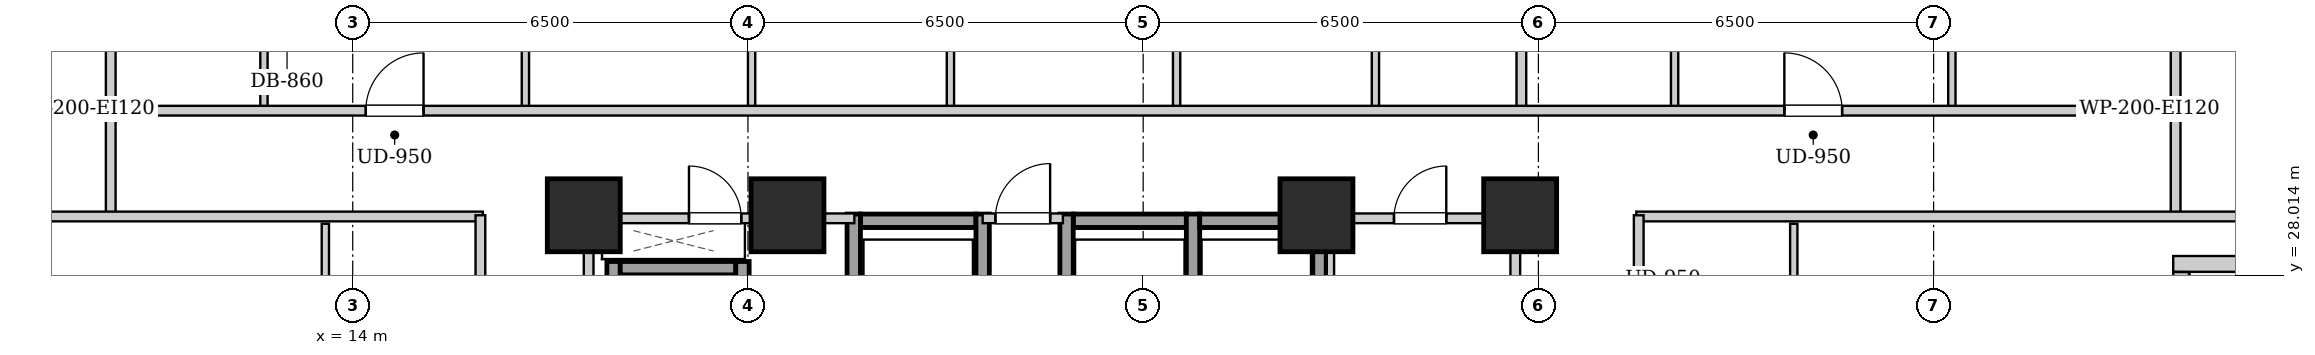
"""IFC4 building model, lengths in metres.
Left out: names, types, materials, properties, quantities, classifications, styles, units other than length and angle.
Written with IfcOpenShell. Run it as: python <this file> out.ifc"""

import sys

from ifc_helpers import new_model, si_unit, direction, frame, frame_2d, origin, origin_2d, place, context, subcontext, project, spatial, rectangle, extrude, element, fill, save


model = new_model("IFC4")
c1 = context("Model", 3, precision=1e-05, world=origin(), true_north=direction((0.0, 1.0)))
c2 = subcontext(c1, "Body", "Model", "MODEL_VIEW")
j1 = project(units=[si_unit("LENGTHUNIT", "METRE"), si_unit("PLANEANGLEUNIT", "RADIAN")], contexts=[c1])
p1 = place(None, origin())
s1 = spatial("IfcSite", under=j1, at=p1, CompositionType="ELEMENT")
p2 = place(p1, origin())
s2 = spatial("IfcBuilding", under=s1, at=p2, CompositionType="ELEMENT")
p3 = place(p2, frame((0.0, 0.0, 48.2)))
s3 = spatial("IfcBuildingStorey", under=s2, at=p3, CompositionType="ELEMENT", Elevation=48.2)
for number, where, z_axis, x_axis in (
    (1, (17.8, 29.0, 0.0), (0.0, 0.0, 1.0), (1.0, 0.0, 0.0)),
    (2, (21.15, 29.0, 0.0), (0.0, 0.0, 1.0), (1.0, 0.0, 0.0)),
    (3, (29.85, 29.0, 0.0), (0.0, 0.0, 1.0), (1.0, 0.0, 0.0)),
    (4, (33.2, 29.0, 0.0), (0.0, 0.0, 1.0), (1.0, 0.0, 0.0)),
):
    element("IfcColumn", number, at=place(p3, frame(where, z_axis=z_axis, x_axis=x_axis)), inside=s3, PredefinedType="COLUMN", context=c2, shape_type="SweptSolid", body=[
        extrude(rectangle(XDim=1.2, YDim=1.2, at=origin_2d()), origin(), (0.0, 0.0, 1.0), 3.2),
    ])
p4 = place(p3, frame((46.34, 28.2, 0.0), z_axis=(0.0, 0.0, 1.0), x_axis=(-1.0, 0.0, 0.0)))
e5 = element("IfcWall", 5, at=p4, inside=s3, PredefinedType="SOLIDWALL", context=c2, shape_type="SweptSolid", body=[
    extrude(rectangle(XDim=2.4, YDim=0.26, at=frame_2d((1.2, 0.0))), origin(), (0.0, 0.0, 1.0), 2.94),
])
p5 = place(p3, frame((44.07, 28.066, 0.0), z_axis=(0.0, 0.0, 1.0), x_axis=(0.0, -1.0, 0.0)))
e6 = element("IfcWall", 6, at=p5, inside=s3, PredefinedType="SOLIDWALL", context=c2, shape_type="SweptSolid", body=[
    extrude(rectangle(XDim=3.332, YDim=0.26, at=frame_2d((1.666, 0.0))), origin(), (0.0, 0.0, 1.0), 2.94),
])
p6 = place(p5, frame((1.116, 0.0, 0.0)))
e7 = element("IfcOpeningElement", 7, at=p6, cuts=e6, PredefinedType="OPENING", context=c2, shape_type="SweptSolid", body=[
    extrude(rectangle(XDim=1.1, YDim=2.0, at=frame_2d((0.55, 1.0))), frame((0.0, 0.14, 0.0), z_axis=(0.0, -1.0, 0.0), x_axis=(1.0, 0.0, 0.0)), (0.0, 0.0, 1.0), 0.28),
])
p7 = place(p5, frame((0.276, 0.0, 0.55)))
e8 = element("IfcOpeningElement", 8, at=p7, cuts=e6, PredefinedType="OPENING", context=c2, shape_type="SweptSolid", body=[
    extrude(rectangle(XDim=0.68, YDim=1.2, at=frame_2d((0.34, 0.6))), frame((0.0, 0.14, 0.0), z_axis=(0.0, -1.0, 0.0), x_axis=(1.0, 0.0, 0.0)), (0.0, 0.0, 1.0), 0.28),
])
p8 = place(p3, frame((22.35, 28.91, 0.0), z_axis=(0.0, 0.0, 1.0), x_axis=(1.0, 0.0, 0.0)))
e9 = element("IfcWall", 9, at=p8, inside=s3, PredefinedType="SHEAR", context=c2, shape_type="SweptSolid", body=[
    extrude(rectangle(XDim=1.9, YDim=0.22, at=frame_2d((0.95, 0.0))), origin(), (0.0, 0.0, 1.0), 2.94),
])
for number, where, z_axis, x_axis in (
    (10, (22.24, 26.58, 0.0), (0.0, 0.0, 1.0), (0.0, 1.0, 0.0)),
    (11, (24.36, 26.58, 0.0), (0.0, 0.0, 1.0), (0.0, 1.0, 0.0)),
):
    element("IfcWall", number, at=place(p3, frame(where, z_axis=z_axis, x_axis=x_axis)), inside=s3, PredefinedType="SHEAR", context=c2, shape_type="SweptSolid", body=[
        extrude(rectangle(XDim=2.44, YDim=0.22, at=frame_2d((1.22, 0.0))), origin(), (0.0, 0.0, 1.0), 2.94),
    ])
p9 = place(p3, frame((25.85, 28.91, 0.0), z_axis=(0.0, 0.0, 1.0), x_axis=(1.0, 0.0, 0.0)))
e12 = element("IfcWall", 12, at=p9, inside=s3, PredefinedType="SHEAR", context=c2, shape_type="SweptSolid", body=[
    extrude(rectangle(XDim=1.86, YDim=0.22, at=frame_2d((0.93, 0.0))), origin(), (0.0, 0.0, 1.0), 2.94),
])
for number, where, z_axis, x_axis in (
    (13, (25.74, 26.58, 0.0), (0.0, 0.0, 1.0), (0.0, 1.0, 0.0)),
    (14, (27.82, 26.58, 0.0), (0.0, 0.0, 1.0), (0.0, 1.0, 0.0)),
):
    element("IfcWall", number, at=place(p3, frame(where, z_axis=z_axis, x_axis=x_axis)), inside=s3, PredefinedType="SHEAR", context=c2, shape_type="SweptSolid", body=[
        extrude(rectangle(XDim=2.44, YDim=0.22, at=frame_2d((1.22, 0.0))), origin(), (0.0, 0.0, 1.0), 2.94),
    ])
p10 = place(p3, frame((27.93, 28.91, 0.0), z_axis=(0.0, 0.0, 1.0), x_axis=(1.0, 0.0, 0.0)))
e15 = element("IfcWall", 15, at=p10, inside=s3, PredefinedType="SHEAR", context=c2, shape_type="SweptSolid", body=[
    extrude(rectangle(XDim=1.86, YDim=0.22, at=frame_2d((0.93, 0.0))), origin(), (0.0, 0.0, 1.0), 2.94),
])
p11 = place(p3, frame((29.9, 26.58, 0.0), z_axis=(0.0, 0.0, 1.0), x_axis=(0.0, 1.0, 0.0)))
e16 = element("IfcWall", 16, at=p11, inside=s3, PredefinedType="SHEAR", context=c2, shape_type="SweptSolid", body=[
    extrude(rectangle(XDim=2.44, YDim=0.22, at=frame_2d((1.22, 0.0))), origin(), (0.0, 0.0, 1.0), 2.94),
])
p12 = place(p3, frame((18.29, 24.1, 0.0), z_axis=(0.0, 0.0, 1.0), x_axis=(0.0, 1.0, 0.0)))
e17 = element("IfcWall", 17, at=p12, inside=s3, PredefinedType="SHEAR", context=c2, shape_type="SweptSolid", body=[
    extrude(rectangle(XDim=4.14, YDim=0.22, at=frame_2d((2.07, 0.0))), origin(), (0.0, 0.0, 1.0), 2.94),
])
p13 = place(p3, frame((18.4, 28.13, 0.0), z_axis=(0.0, 0.0, 1.0), x_axis=(1.0, 0.0, 0.0)))
e18 = element("IfcWall", 18, at=p13, inside=s3, PredefinedType="SHEAR", context=c2, shape_type="SweptSolid", body=[
    extrude(rectangle(XDim=1.9, YDim=0.22, at=frame_2d((0.95, 0.0))), origin(), (0.0, 0.0, 1.0), 2.94),
])
p14 = place(p3, frame((20.41, 26.06, 0.0), z_axis=(0.0, 0.0, 1.0), x_axis=(0.0, 1.0, 0.0)))
e19 = element("IfcWall", 19, at=p14, inside=s3, PredefinedType="SHEAR", context=c2, shape_type="SweptSolid", body=[
    extrude(rectangle(XDim=2.18, YDim=0.22, at=frame_2d((1.09, 0.0))), origin(), (0.0, 0.0, 1.0), 2.94),
])
for number, where, z_axis, x_axis in (
    (20, (17.88, 24.12, 0.0), (0.0, 0.0, 1.0), (0.0, 1.0, 0.0)),
    (21, (33.12, 24.12, 0.0), (0.0, 0.0, 1.0), (0.0, 1.0, 0.0)),
):
    element("IfcWall", number, at=place(p3, frame(where, z_axis=z_axis, x_axis=x_axis)), inside=s3, PredefinedType="PARTITIONING", context=c2, shape_type="SweptSolid", body=[
        extrude(rectangle(XDim=4.76, YDim=0.16, at=frame_2d((2.38, 0.0))), origin(), (0.0, 0.0, 1.0), 2.275),
    ])
p15 = place(p3, frame((24.36, 28.95, 0.0), z_axis=(0.0, 0.0, 1.0), x_axis=(1.0, 0.0, 0.0)))
e22 = element("IfcWall", 22, at=p15, inside=s3, PredefinedType="PARTITIONING", context=c2, shape_type="SweptSolid", body=[
    extrude(rectangle(XDim=1.32, YDim=0.16, at=frame_2d((0.66, 0.0))), origin(), (0.0, 0.0, 1.0), 2.232),
])
p16 = place(p15, frame((0.21, 0.0, 0.0)))
e23 = element("IfcOpeningElement", 23, at=p16, cuts=e22, PredefinedType="OPENING", context=c2, shape_type="SweptSolid", body=[
    extrude(rectangle(XDim=0.9, YDim=2.05, at=frame_2d((0.45, 1.025))), frame((0.0, 0.09, 0.0), z_axis=(0.0, -1.0, 0.0), x_axis=(1.0, 0.0, 0.0)), (0.0, 0.0, 1.0), 0.18),
])
p17 = place(p3, frame((17.96, 28.95, 0.0), z_axis=(0.0, 0.0, 1.0), x_axis=(1.0, 0.0, 0.0)))
e24 = element("IfcWall", 24, at=p17, inside=s3, PredefinedType="PARTITIONING", context=c2, shape_type="SweptSolid", body=[
    extrude(rectangle(XDim=4.29, YDim=0.16, at=frame_2d((2.145, 0.0))), origin(), (0.0, 0.0, 1.0), 2.232),
])
p18 = place(p17, frame((1.57, 0.0, 0.0)))
e25 = element("IfcOpeningElement", 25, at=p18, cuts=e24, PredefinedType="OPENING", context=c2, shape_type="SweptSolid", body=[
    extrude(rectangle(XDim=0.86, YDim=2.05, at=frame_2d((0.43, 1.025))), frame((0.0, 0.09, 0.0), z_axis=(0.0, -1.0, 0.0), x_axis=(1.0, 0.0, 0.0)), (0.0, 0.0, 1.0), 0.18),
])
p19 = place(p3, frame((30.08, 26.18, 0.0), z_axis=(0.0, 0.0, 1.0), x_axis=(0.0, 1.0, 0.0)))
e26 = element("IfcWall", 26, at=p19, inside=s3, PredefinedType="PARTITIONING", context=c2, shape_type="SweptSolid", body=[
    extrude(rectangle(XDim=2.68, YDim=0.12, at=frame_2d((1.34, 0.0))), origin(), (0.0, 0.0, 1.0), 2.94),
])
p20 = place(p3, frame((30.08, 28.95, 0.0), z_axis=(0.0, 0.0, 1.0), x_axis=(1.0, 0.0, 0.0)))
e27 = element("IfcWall", 27, at=p20, inside=s3, PredefinedType="PARTITIONING", context=c2, shape_type="SweptSolid", body=[
    extrude(rectangle(XDim=2.96, YDim=0.16, at=frame_2d((1.48, 0.0))), origin(), (0.0, 0.0, 1.0), 2.94),
])
p21 = place(p20, frame((1.045, 0.0, 0.0)))
e28 = element("IfcOpeningElement", 28, at=p21, cuts=e27, PredefinedType="OPENING", context=c2, shape_type="SweptSolid", body=[
    extrude(rectangle(XDim=0.86, YDim=2.05, at=frame_2d((0.43, 1.025))), frame((0.0, 0.09, 0.0), z_axis=(0.0, -1.0, 0.0), x_axis=(1.0, 0.0, 0.0)), (0.0, 0.0, 1.0), 0.18),
])
for number, where, z_axis, x_axis in (
    (29, (10.02, 28.98, 0.0), (0.0, 0.0, 1.0), (0.0, 1.0, 0.0)),
    (30, (43.98, 28.98, 0.0), (0.0, 0.0, 1.0), (0.0, 1.0, 0.0)),
):
    element("IfcWall", number, at=place(p3, frame(where, z_axis=z_axis, x_axis=x_axis)), inside=s3, PredefinedType="PARTITIONING", context=c2, shape_type="SweptSolid", body=[
        extrude(rectangle(XDim=1.74, YDim=0.16, at=frame_2d((0.87, 0.0))), origin(), (0.0, 0.0, 1.0), 2.94),
    ])
p22 = place(p3, frame((7.78, 28.98, 0.0), z_axis=(0.0, 0.0, 1.0), x_axis=(1.0, 0.0, 0.0)))
e31 = element("IfcWall", 31, at=p22, inside=s3, PredefinedType="PARTITIONING", context=c2, shape_type="SweptSolid", body=[
    extrude(rectangle(XDim=8.36, YDim=0.16, at=frame_2d((4.18, 0.0))), origin(), (0.0, 0.0, 1.0), 2.232),
])
p23 = place(p3, frame((35.11, 28.98, 0.0), z_axis=(0.0, 0.0, 1.0), x_axis=(1.0, 0.0, 0.0)))
e32 = element("IfcWall", 32, at=p23, inside=s3, PredefinedType="PARTITIONING", context=c2, shape_type="SweptSolid", body=[
    extrude(rectangle(XDim=11.11, YDim=0.16, at=frame_2d((5.555, 0.0))), origin(), (0.0, 0.0, 1.0), 2.232),
])
p24 = place(p3, frame((10.02, 30.76, 0.0), z_axis=(0.0, 0.0, 1.0), x_axis=(0.0, 1.0, 0.0)))
e33 = element("IfcWall", 33, at=p24, inside=s3, PredefinedType="PARTITIONING", context=c2, shape_type="SweptSolid", body=[
    extrude(rectangle(XDim=2.91, YDim=0.16, at=frame_2d((1.455, 0.0))), origin(), (0.0, 0.0, 1.0), 2.94),
])
p25 = place(p3, frame((12.54, 30.76, 0.0), z_axis=(0.0, 0.0, 1.0), x_axis=(0.0, 1.0, 0.0)))
e34 = element("IfcWall", 34, at=p25, inside=s3, PredefinedType="PARTITIONING", context=c2, shape_type="SweptSolid", body=[
    extrude(rectangle(XDim=2.85, YDim=0.12, at=frame_2d((1.425, 0.0))), origin(), (0.0, 0.0, 1.0), 2.94),
])
p26 = place(p25, frame((0.995, 0.0, 0.0)))
e35 = element("IfcOpeningElement", 35, at=p26, cuts=e34, PredefinedType="OPENING", context=c2, shape_type="SweptSolid", body=[
    extrude(rectangle(XDim=0.86, YDim=2.05, at=frame_2d((0.43, 1.025))), frame((0.0, 0.07, 0.0), z_axis=(0.0, -1.0, 0.0), x_axis=(1.0, 0.0, 0.0)), (0.0, 0.0, 1.0), 0.14),
])
p27 = place(p3, frame((16.84, 30.76, 0.0), z_axis=(0.0, 0.0, 1.0), x_axis=(0.0, 1.0, 0.0)))
e36 = element("IfcWall", 36, at=p27, inside=s3, PredefinedType="PARTITIONING", context=c2, shape_type="SweptSolid", body=[
    extrude(rectangle(XDim=2.85, YDim=0.12, at=frame_2d((1.425, 0.0))), origin(), (0.0, 0.0, 1.0), 2.94),
])
p28 = place(p27, frame((0.975, 0.0, 0.0)))
e37 = element("IfcOpeningElement", 37, at=p28, cuts=e36, PredefinedType="OPENING", context=c2, shape_type="SweptSolid", body=[
    extrude(rectangle(XDim=0.9, YDim=2.05, at=frame_2d((0.45, 1.025))), frame((0.0, 0.07, 0.0), z_axis=(0.0, -1.0, 0.0), x_axis=(1.0, 0.0, 0.0)), (0.0, 0.0, 1.0), 0.14),
])
p29 = place(p3, frame((20.56, 30.76, 0.0), z_axis=(0.0, 0.0, 1.0), x_axis=(0.0, 1.0, 0.0)))
e38 = element("IfcWall", 38, at=p29, inside=s3, PredefinedType="PARTITIONING", context=c2, shape_type="SweptSolid", body=[
    extrude(rectangle(XDim=2.85, YDim=0.12, at=frame_2d((1.425, 0.0))), origin(), (0.0, 0.0, 1.0), 2.94),
])
p30 = place(p29, frame((0.975, 0.0, 0.0)))
e39 = element("IfcOpeningElement", 39, at=p30, cuts=e38, PredefinedType="OPENING", context=c2, shape_type="SweptSolid", body=[
    extrude(rectangle(XDim=0.9, YDim=2.05, at=frame_2d((0.45, 1.025))), frame((0.0, 0.07, 0.0), z_axis=(0.0, -1.0, 0.0), x_axis=(1.0, 0.0, 0.0)), (0.0, 0.0, 1.0), 0.14),
])
p31 = place(p3, frame((23.83, 30.76, 0.0), z_axis=(0.0, 0.0, 1.0), x_axis=(0.0, 1.0, 0.0)))
e40 = element("IfcWall", 40, at=p31, inside=s3, PredefinedType="PARTITIONING", context=c2, shape_type="SweptSolid", body=[
    extrude(rectangle(XDim=2.85, YDim=0.12, at=frame_2d((1.425, 0.0))), origin(), (0.0, 0.0, 1.0), 2.94),
])
p32 = place(p31, frame((0.975, 0.0, 0.0)))
e41 = element("IfcOpeningElement", 41, at=p32, cuts=e40, PredefinedType="OPENING", context=c2, shape_type="SweptSolid", body=[
    extrude(rectangle(XDim=0.9, YDim=2.05, at=frame_2d((0.45, 1.025))), frame((0.0, 0.07, 0.0), z_axis=(0.0, -1.0, 0.0), x_axis=(1.0, 0.0, 0.0)), (0.0, 0.0, 1.0), 0.14),
])
p33 = place(p3, frame((27.55, 30.76, 0.0), z_axis=(0.0, 0.0, 1.0), x_axis=(0.0, 1.0, 0.0)))
e42 = element("IfcWall", 42, at=p33, inside=s3, PredefinedType="PARTITIONING", context=c2, shape_type="SweptSolid", body=[
    extrude(rectangle(XDim=2.85, YDim=0.12, at=frame_2d((1.425, 0.0))), origin(), (0.0, 0.0, 1.0), 2.94),
])
p34 = place(p33, frame((0.975, 0.0, 0.0)))
e43 = element("IfcOpeningElement", 43, at=p34, cuts=e42, PredefinedType="OPENING", context=c2, shape_type="SweptSolid", body=[
    extrude(rectangle(XDim=0.9, YDim=2.05, at=frame_2d((0.45, 1.025))), frame((0.0, 0.07, 0.0), z_axis=(0.0, -1.0, 0.0), x_axis=(1.0, 0.0, 0.0)), (0.0, 0.0, 1.0), 0.14),
])
p35 = place(p3, frame((30.82, 30.76, 0.0), z_axis=(0.0, 0.0, 1.0), x_axis=(0.0, 1.0, 0.0)))
e44 = element("IfcWall", 44, at=p35, inside=s3, PredefinedType="PARTITIONING", context=c2, shape_type="SweptSolid", body=[
    extrude(rectangle(XDim=2.85, YDim=0.12, at=frame_2d((1.425, 0.0))), origin(), (0.0, 0.0, 1.0), 2.94),
])
p36 = place(p35, frame((0.975, 0.0, 0.0)))
e45 = element("IfcOpeningElement", 45, at=p36, cuts=e44, PredefinedType="OPENING", context=c2, shape_type="SweptSolid", body=[
    extrude(rectangle(XDim=0.9, YDim=2.05, at=frame_2d((0.45, 1.025))), frame((0.0, 0.07, 0.0), z_axis=(0.0, -1.0, 0.0), x_axis=(1.0, 0.0, 0.0)), (0.0, 0.0, 1.0), 0.14),
])
p37 = place(p3, frame((43.98, 30.76, 0.0), z_axis=(0.0, 0.0, 1.0), x_axis=(0.0, 1.0, 0.0)))
e46 = element("IfcWall", 46, at=p37, inside=s3, PredefinedType="PARTITIONING", context=c2, shape_type="SweptSolid", body=[
    extrude(rectangle(XDim=2.91, YDim=0.16, at=frame_2d((1.455, 0.0))), origin(), (0.0, 0.0, 1.0), 2.94),
])
p38 = place(p3, frame((33.22, 30.76, 0.0), z_axis=(0.0, 0.0, 1.0), x_axis=(0.0, 1.0, 0.0)))
e47 = element("IfcWall", 47, at=p38, inside=s3, PredefinedType="PARTITIONING", context=c2, shape_type="SweptSolid", body=[
    extrude(rectangle(XDim=16.56, YDim=0.16, at=frame_2d((8.28, 0.0))), origin(), (0.0, 0.0, 1.0), 2.232),
])
p39 = place(p3, frame((35.74, 30.76, 0.0), z_axis=(0.0, 0.0, 1.0), x_axis=(0.0, 1.0, 0.0)))
e48 = element("IfcWall", 48, at=p39, inside=s3, PredefinedType="PARTITIONING", context=c2, shape_type="SweptSolid", body=[
    extrude(rectangle(XDim=2.85, YDim=0.12, at=frame_2d((1.425, 0.0))), origin(), (0.0, 0.0, 1.0), 2.94),
])
p40 = place(p39, frame((0.995, 0.0, 0.0)))
e49 = element("IfcOpeningElement", 49, at=p40, cuts=e48, PredefinedType="OPENING", context=c2, shape_type="SweptSolid", body=[
    extrude(rectangle(XDim=0.86, YDim=2.05, at=frame_2d((0.43, 1.025))), frame((0.0, 0.07, 0.0), z_axis=(0.0, -1.0, 0.0), x_axis=(1.0, 0.0, 0.0)), (0.0, 0.0, 1.0), 0.14),
])
p41 = place(p3, frame((40.3, 30.76, 0.0), z_axis=(0.0, 0.0, 1.0), x_axis=(0.0, 1.0, 0.0)))
e50 = element("IfcWall", 50, at=p41, inside=s3, PredefinedType="PARTITIONING", context=c2, shape_type="SweptSolid", body=[
    extrude(rectangle(XDim=2.85, YDim=0.12, at=frame_2d((1.425, 0.0))), origin(), (0.0, 0.0, 1.0), 2.94),
])
p42 = place(p41, frame((0.975, 0.0, 0.0)))
e51 = element("IfcOpeningElement", 51, at=p42, cuts=e50, PredefinedType="OPENING", context=c2, shape_type="SweptSolid", body=[
    extrude(rectangle(XDim=0.9, YDim=2.05, at=frame_2d((0.45, 1.025))), frame((0.0, 0.07, 0.0), z_axis=(0.0, -1.0, 0.0), x_axis=(1.0, 0.0, 0.0)), (0.0, 0.0, 1.0), 0.14),
])
p43 = place(p3, frame((13.55, 24.552, 0.0), z_axis=(0.0, 0.0, 1.0), x_axis=(0.0, 1.0, 0.0)))
e52 = element("IfcWall", 52, at=p43, inside=s3, PredefinedType="PARTITIONING", context=c2, shape_type="SweptSolid", body=[
    extrude(rectangle(XDim=4.308, YDim=0.12, at=frame_2d((2.154, 0.0))), origin(), (0.0, 0.0, 1.0), 2.94),
])
p44 = place(p43, frame((1.704, 0.0, 0.0)))
e53 = element("IfcOpeningElement", 53, at=p44, cuts=e52, PredefinedType="OPENING", context=c2, shape_type="SweptSolid", body=[
    extrude(rectangle(XDim=0.9, YDim=2.05, at=frame_2d((0.45, 1.025))), frame((0.0, 0.07, 0.0), z_axis=(0.0, -1.0, 0.0), x_axis=(1.0, 0.0, 0.0)), (0.0, 0.0, 1.0), 0.14),
])
p45 = place(p3, frame((37.7, 25.052, 0.0), z_axis=(0.0, 0.0, 1.0), x_axis=(0.0, 1.0, 0.0)))
e54 = element("IfcWall", 54, at=p45, inside=s3, PredefinedType="PARTITIONING", context=c2, shape_type="SweptSolid", body=[
    extrude(rectangle(XDim=3.808, YDim=0.12, at=frame_2d((1.904, 0.0))), origin(), (0.0, 0.0, 1.0), 2.94),
])
p46 = place(p45, frame((1.454, 0.0, 0.0)))
e55 = element("IfcOpeningElement", 55, at=p46, cuts=e54, PredefinedType="OPENING", context=c2, shape_type="SweptSolid", body=[
    extrude(rectangle(XDim=0.9, YDim=2.05, at=frame_2d((0.45, 1.025))), frame((0.0, 0.07, 0.0), z_axis=(0.0, -1.0, 0.0), x_axis=(1.0, 0.0, 0.0)), (0.0, 0.0, 1.0), 0.14),
])
p47 = place(p3, frame((10.05, 30.72, 0.0), z_axis=(0.0, 0.0, 1.0), x_axis=(1.0, 0.0, 0.0)))
e56 = element("IfcWall", 56, at=p47, inside=s3, PredefinedType="PARTITIONING", context=c2, shape_type="SweptSolid", body=[
    extrude(rectangle(XDim=33.9, YDim=0.16, at=frame_2d((16.95, 0.0))), origin(), (0.0, 0.0, 1.0), 2.94),
])
p48 = place(p47, frame((4.165, 0.0, 0.0)))
e57 = element("IfcOpeningElement", 57, at=p48, cuts=e56, PredefinedType="OPENING", context=c2, shape_type="SweptSolid", body=[
    extrude(rectangle(XDim=0.95, YDim=2.1, at=frame_2d((0.475, 1.05))), frame((0.0, 0.09, 0.0), z_axis=(0.0, -1.0, 0.0), x_axis=(1.0, 0.0, 0.0)), (0.0, 0.0, 1.0), 0.18),
])
p49 = place(p47, frame((27.495, 0.0, 0.0)))
e58 = element("IfcOpeningElement", 58, at=p49, cuts=e56, PredefinedType="OPENING", context=c2, shape_type="SweptSolid", body=[
    extrude(rectangle(XDim=0.95, YDim=2.1, at=frame_2d((0.475, 1.05))), frame((0.0, 0.09, 0.0), z_axis=(0.0, -1.0, 0.0), x_axis=(1.0, 0.0, 0.0)), (0.0, 0.0, 1.0), 0.18),
])
p50 = place(p3, frame((16.1, 15.07, 0.0), z_axis=(0.0, 0.0, 1.0), x_axis=(0.0, 1.0, 0.0)))
e59 = element("IfcWall", 59, at=p50, inside=s3, PredefinedType="PARTITIONING", context=c2, shape_type="SweptSolid", body=[
    extrude(rectangle(XDim=13.93, YDim=0.16, at=frame_2d((6.965, 0.0))), origin(), (0.0, 0.0, 1.0), 2.94),
])
p51 = place(p50, frame((4.385, 0.0, 0.0)))
e60 = element("IfcOpeningElement", 60, at=p51, cuts=e59, PredefinedType="OPENING", context=c2, shape_type="SweptSolid", body=[
    extrude(rectangle(XDim=0.95, YDim=2.1, at=frame_2d((0.475, 1.05))), frame((0.0, 0.09, 0.0), z_axis=(0.0, -1.0, 0.0), x_axis=(1.0, 0.0, 0.0)), (0.0, 0.0, 1.0), 0.18),
])
p52 = place(p3, frame((35.15, 15.07, 0.0), z_axis=(0.0, 0.0, 1.0), x_axis=(0.0, 1.0, 0.0)))
e61 = element("IfcWall", 61, at=p52, inside=s3, PredefinedType="PARTITIONING", context=c2, shape_type="SweptSolid", body=[
    extrude(rectangle(XDim=13.93, YDim=0.16, at=frame_2d((6.965, 0.0))), origin(), (0.0, 0.0, 1.0), 2.94),
])
p53 = place(p52, frame((4.661, 0.0, 0.0)))
e62 = element("IfcOpeningElement", 62, at=p53, cuts=e61, PredefinedType="OPENING", context=c2, shape_type="SweptSolid", body=[
    extrude(rectangle(XDim=0.95, YDim=2.1, at=frame_2d((0.475, 1.05))), frame((0.0, 0.09, 0.0), z_axis=(0.0, -1.0, 0.0), x_axis=(1.0, 0.0, 0.0)), (0.0, 0.0, 1.0), 0.18),
])
p54 = place(p52, frame((11.411, 0.0, 0.0)))
e63 = element("IfcOpeningElement", 63, at=p54, cuts=e61, PredefinedType="OPENING", context=c2, shape_type="SweptSolid", body=[
    extrude(rectangle(XDim=0.95, YDim=2.1, at=frame_2d((0.475, 1.05))), frame((0.0, 0.09, 0.0), z_axis=(0.0, -1.0, 0.0), x_axis=(1.0, 0.0, 0.0)), (0.0, 0.0, 1.0), 0.18),
])
p55 = place(p16, origin())
e64 = element("IfcDoor", 64, at=p55, inside=s3, OperationType="SINGLE_SWING_RIGHT", PredefinedType="DOOR", context=c2, shape_type="SweptSolid", body=[
    extrude(rectangle(XDim=0.9, YDim=2.05, at=frame_2d((0.45, 1.025))), frame((0.0, 0.025, 0.0), z_axis=(0.0, -1.0, 0.0), x_axis=(1.0, 0.0, 0.0)), (0.0, 0.0, 1.0), 0.05),
])
fill(e23, e64)
p56 = place(p18, origin())
e65 = element("IfcDoor", 65, at=p56, inside=s3, OperationType="SINGLE_SWING_LEFT", PredefinedType="DOOR", context=c2, shape_type="SweptSolid", body=[
    extrude(rectangle(XDim=0.86, YDim=2.05, at=frame_2d((0.43, 1.025))), frame((0.0, 0.025, 0.0), z_axis=(0.0, -1.0, 0.0), x_axis=(1.0, 0.0, 0.0)), (0.0, 0.0, 1.0), 0.05),
])
fill(e25, e65)
p57 = place(p21, origin())
e66 = element("IfcDoor", 66, at=p57, inside=s3, OperationType="SINGLE_SWING_RIGHT", PredefinedType="DOOR", context=c2, shape_type="SweptSolid", body=[
    extrude(rectangle(XDim=0.86, YDim=2.05, at=frame_2d((0.43, 1.025))), frame((0.0, 0.025, 0.0), z_axis=(0.0, -1.0, 0.0), x_axis=(1.0, 0.0, 0.0)), (0.0, 0.0, 1.0), 0.05),
])
fill(e28, e66)
p58 = place(p48, origin())
e67 = element("IfcDoor", 67, at=p58, inside=s3, OperationType="SINGLE_SWING_RIGHT", PredefinedType="DOOR", context=c2, shape_type="SweptSolid", body=[
    extrude(rectangle(XDim=0.95, YDim=2.1, at=frame_2d((0.475, 1.05))), frame((0.0, 0.025, 0.0), z_axis=(0.0, -1.0, 0.0), x_axis=(1.0, 0.0, 0.0)), (0.0, 0.0, 1.0), 0.05),
])
fill(e57, e67)
p59 = place(p49, origin())
e68 = element("IfcDoor", 68, at=p59, inside=s3, OperationType="SINGLE_SWING_LEFT", PredefinedType="DOOR", context=c2, shape_type="SweptSolid", body=[
    extrude(rectangle(XDim=0.95, YDim=2.1, at=frame_2d((0.475, 1.05))), frame((0.0, 0.025, 0.0), z_axis=(0.0, -1.0, 0.0), x_axis=(1.0, 0.0, 0.0)), (0.0, 0.0, 1.0), 0.05),
])
fill(e58, e68)
save(model, sys.argv[1])
